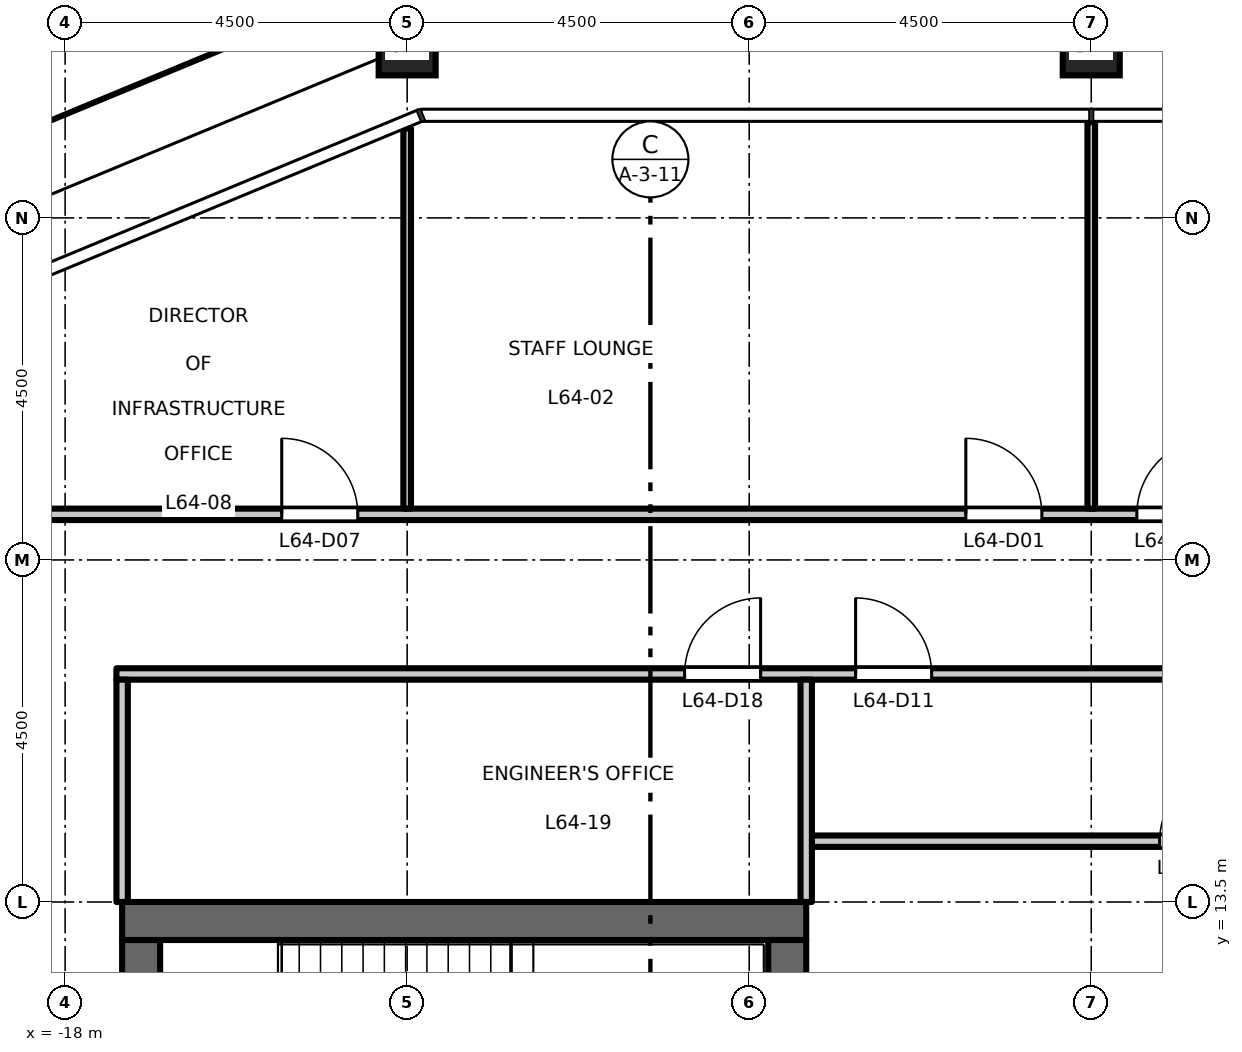
"""IFC4 building model, lengths in metres.
Left out: names, types, materials, properties, quantities, classifications, styles, units other than length and angle.
Written with IfcOpenShell. Run it as: python <this file> out.ifc"""

import sys

from ifc_helpers import new_model, si_unit, direction, frame, frame_2d, origin, origin_2d, place, context, subcontext, project, spatial, rectangle, hollow_rectangle, extrude, element, fill, save


model = new_model("IFC4")
c1 = context("Model", 3, precision=1e-05, world=origin(), true_north=direction((0.0, 1.0)))
c2 = subcontext(c1, "Body", "Model", "MODEL_VIEW")
j1 = project(units=[si_unit("LENGTHUNIT", "METRE"), si_unit("PLANEANGLEUNIT", "RADIAN")], contexts=[c1])
p1 = place(None, origin())
s1 = spatial("IfcSite", under=j1, at=p1, CompositionType="ELEMENT")
p2 = place(p1, origin())
s2 = spatial("IfcBuilding", under=s1, at=p2, CompositionType="ELEMENT")
p3 = place(p2, frame((0.0, 0.0, 298.7)))
s3 = spatial("IfcBuildingStorey", under=s2, at=p3, CompositionType="ELEMENT", Elevation=298.7)
for number, where, z_axis, x_axis in (
    (1, (-4.5, 24.75, 0.0), (0.0, 0.0, 1.0), (1.0, 0.0, 0.0)),
    (2, (-13.5, 24.75, 0.0), (0.0, 0.0, 1.0), (1.0, 0.0, 0.0)),
):
    element("IfcColumn", number, at=place(p3, frame(where, z_axis=z_axis, x_axis=x_axis)), inside=s3, PredefinedType="COLUMN", context=c2, shape_type="SweptSolid", body=[
        extrude(hollow_rectangle(XDim=0.75, YDim=0.75, WallThickness=0.04, at=origin_2d()), origin(), (0.0, 0.0, 1.0), 4.5),
    ])
p4 = place(p3, frame((-17.0, -13.0, 0.0), z_axis=(0.0, 0.0, 1.0), x_axis=(0.0, 1.0, 0.0)))
e3 = element("IfcWall", 3, at=p4, inside=s3, PredefinedType="SHEAR", context=c2, shape_type="SweptSolid", body=[
    extrude(rectangle(XDim=26.0, YDim=0.5, at=frame_2d((13.0, 0.0))), origin(), (0.0, 0.0, 1.0), 4.35),
])
p5 = place(p4, frame((16.825, 0.0, 0.0)))
e4 = element("IfcOpeningElement", 4, at=p5, cuts=e3, PredefinedType="OPENING", context=c2, shape_type="SweptSolid", body=[
    extrude(rectangle(XDim=1.8, YDim=2.1, at=frame_2d((0.9, 1.05))), frame((0.0, 0.26, 0.0), z_axis=(0.0, -1.0, 0.0), x_axis=(1.0, 0.0, 0.0)), (0.0, 0.0, 1.0), 0.52),
])
p6 = place(p4, frame((7.375, 0.0, 0.0)))
e5 = element("IfcOpeningElement", 5, at=p6, cuts=e3, PredefinedType="OPENING", context=c2, shape_type="SweptSolid", body=[
    extrude(rectangle(XDim=1.8, YDim=2.1, at=frame_2d((0.9, 1.05))), frame((0.0, 0.26, 0.0), z_axis=(0.0, -1.0, 0.0), x_axis=(1.0, 0.0, 0.0)), (0.0, 0.0, 1.0), 0.52),
])
p7 = place(p3, frame((-8.25, 13.25, 0.0), z_axis=(0.0, 0.0, 1.0), x_axis=(-1.0, 0.0, 0.0)))
e6 = element("IfcWall", 6, at=p7, inside=s3, PredefinedType="SHEAR", context=c2, shape_type="SweptSolid", body=[
    extrude(rectangle(XDim=9.0, YDim=0.5, at=frame_2d((4.5, 0.0))), origin(), (0.0, 0.0, 1.0), 4.35),
])
p8 = place(p3, frame((-8.5, -13.0, 0.0), z_axis=(0.0, 0.0, 1.0), x_axis=(0.0, 1.0, 0.0)))
e7 = element("IfcWall", 7, at=p8, inside=s3, PredefinedType="SHEAR", context=c2, shape_type="SweptSolid", body=[
    extrude(rectangle(XDim=26.0, YDim=0.5, at=frame_2d((13.0, 0.0))), origin(), (0.0, 0.0, 1.0), 4.35),
])
p9 = place(p3, frame((-8.175, 14.3, 0.0), z_axis=(0.0, 0.0, 1.0), x_axis=(1.0, 0.0, 0.0)))
e8 = element("IfcWall", 8, at=p9, inside=s3, PredefinedType="PARTITIONING", context=c2, shape_type="SweptSolid", body=[
    extrude(rectangle(XDim=15.095, YDim=0.15, at=frame_2d((7.547, 0.0))), origin(), (0.0, 0.0, 1.0), 4.35),
])
p10 = place(p9, frame((4.575, 0.0, 0.0)))
e9 = element("IfcOpeningElement", 9, at=p10, cuts=e8, PredefinedType="OPENING", context=c2, shape_type="SweptSolid", body=[
    extrude(rectangle(XDim=1.0, YDim=2.1, at=frame_2d((0.5, 1.05))), frame((0.0, 0.085, 0.0), z_axis=(0.0, -1.0, 0.0), x_axis=(1.0, 0.0, 0.0)), (0.0, 0.0, 1.0), 0.17),
])
p11 = place(p9, frame((6.825, 0.0, 0.0)))
e10 = element("IfcOpeningElement", 10, at=p11, cuts=e8, PredefinedType="OPENING", context=c2, shape_type="SweptSolid", body=[
    extrude(rectangle(XDim=1.0, YDim=2.1, at=frame_2d((0.5, 1.05))), frame((0.0, 0.085, 0.0), z_axis=(0.0, -1.0, 0.0), x_axis=(1.0, 0.0, 0.0)), (0.0, 0.0, 1.0), 0.17),
])
p12 = place(p9, frame((13.575, 0.0, 0.0)))
e11 = element("IfcOpeningElement", 11, at=p12, cuts=e8, PredefinedType="OPENING", context=c2, shape_type="SweptSolid", body=[
    extrude(rectangle(XDim=1.0, YDim=2.1, at=frame_2d((0.5, 1.05))), frame((0.0, 0.085, 0.0), z_axis=(0.0, -1.0, 0.0), x_axis=(1.0, 0.0, 0.0)), (0.0, 0.0, 1.0), 0.17),
])
p13 = place(p3, frame((-17.325, 16.5, 0.0), z_axis=(0.0, 0.0, 1.0), x_axis=(1.0, 0.0, 0.0)))
e12 = element("IfcWall", 12, at=p13, inside=s3, PredefinedType="PARTITIONING", context=c2, shape_type="SweptSolid", body=[
    extrude(rectangle(XDim=34.65, YDim=0.15, at=frame_2d((17.325, 0.0))), origin(), (0.0, 0.0, 1.0), 4.35),
])
p14 = place(p13, frame((9.725, 0.0, 0.0)))
e13 = element("IfcOpeningElement", 13, at=p14, cuts=e12, PredefinedType="OPENING", context=c2, shape_type="SweptSolid", body=[
    extrude(rectangle(XDim=1.0, YDim=2.1, at=frame_2d((0.5, 1.05))), frame((0.0, 0.085, 0.0), z_axis=(0.0, -1.0, 0.0), x_axis=(1.0, 0.0, 0.0)), (0.0, 0.0, 1.0), 0.17),
])
p15 = place(p13, frame((7.475, 0.0, 0.0)))
e14 = element("IfcOpeningElement", 14, at=p15, cuts=e12, PredefinedType="OPENING", context=c2, shape_type="SweptSolid", body=[
    extrude(rectangle(XDim=1.0, YDim=2.1, at=frame_2d((0.5, 1.05))), frame((0.0, 0.085, 0.0), z_axis=(0.0, -1.0, 0.0), x_axis=(1.0, 0.0, 0.0)), (0.0, 0.0, 1.0), 0.17),
])
p16 = place(p13, frame((26.225, 0.0, 0.0)))
e15 = element("IfcOpeningElement", 15, at=p16, cuts=e12, PredefinedType="OPENING", context=c2, shape_type="SweptSolid", body=[
    extrude(rectangle(XDim=1.0, YDim=2.1, at=frame_2d((0.5, 1.05))), frame((0.0, 0.085, 0.0), z_axis=(0.0, -1.0, 0.0), x_axis=(1.0, 0.0, 0.0)), (0.0, 0.0, 1.0), 0.17),
])
p17 = place(p3, frame((-21.566, 18.6, 0.0), z_axis=(0.0, 0.0, 1.0), x_axis=(1.0, 0.0, 0.0)))
e16 = element("IfcWall", 16, at=p17, inside=s3, PredefinedType="PARTITIONING", context=c2, shape_type="SweptSolid", body=[
    extrude(rectangle(XDim=43.132, YDim=0.15, at=frame_2d((21.566, 0.0))), origin(), (0.0, 0.0, 1.0), 4.35),
])
p18 = place(p17, frame((15.416, 0.0, 0.0)))
e17 = element("IfcOpeningElement", 17, at=p18, cuts=e16, PredefinedType="OPENING", context=c2, shape_type="SweptSolid", body=[
    extrude(rectangle(XDim=1.0, YDim=2.1, at=frame_2d((0.5, 1.05))), frame((0.0, 0.085, 0.0), z_axis=(0.0, -1.0, 0.0), x_axis=(1.0, 0.0, 0.0)), (0.0, 0.0, 1.0), 0.17),
])
p19 = place(p17, frame((17.666, 0.0, 0.0)))
e18 = element("IfcOpeningElement", 18, at=p19, cuts=e16, PredefinedType="OPENING", context=c2, shape_type="SweptSolid", body=[
    extrude(rectangle(XDim=1.0, YDim=2.1, at=frame_2d((0.5, 1.05))), frame((0.0, 0.085, 0.0), z_axis=(0.0, -1.0, 0.0), x_axis=(1.0, 0.0, 0.0)), (0.0, 0.0, 1.0), 0.17),
])
p20 = place(p17, frame((33.416, 0.0, 0.0)))
e19 = element("IfcOpeningElement", 19, at=p20, cuts=e16, PredefinedType="OPENING", context=c2, shape_type="SweptSolid", body=[
    extrude(rectangle(XDim=1.0, YDim=2.1, at=frame_2d((0.5, 1.05))), frame((0.0, 0.085, 0.0), z_axis=(0.0, -1.0, 0.0), x_axis=(1.0, 0.0, 0.0)), (0.0, 0.0, 1.0), 0.17),
])
p21 = place(p17, frame((6.416, 0.0, 0.0)))
e20 = element("IfcOpeningElement", 20, at=p21, cuts=e16, PredefinedType="OPENING", context=c2, shape_type="SweptSolid", body=[
    extrude(rectangle(XDim=1.0, YDim=2.1, at=frame_2d((0.5, 1.05))), frame((0.0, 0.085, 0.0), z_axis=(0.0, -1.0, 0.0), x_axis=(1.0, 0.0, 0.0)), (0.0, 0.0, 1.0), 0.17),
])
p22 = place(p17, frame((35.732, 0.0, 0.0)))
e21 = element("IfcOpeningElement", 21, at=p22, cuts=e16, PredefinedType="OPENING", context=c2, shape_type="SweptSolid", body=[
    extrude(rectangle(XDim=1.0, YDim=2.1, at=frame_2d((0.5, 1.05))), frame((0.0, 0.085, 0.0), z_axis=(0.0, -1.0, 0.0), x_axis=(1.0, 0.0, 0.0)), (0.0, 0.0, 1.0), 0.17),
])
p23 = place(p3, frame((-17.25, 13.5, 0.0), z_axis=(0.0, 0.0, 1.0), x_axis=(0.0, 1.0, 0.0)))
e22 = element("IfcWall", 22, at=p23, inside=s3, PredefinedType="PARTITIONING", context=c2, shape_type="SweptSolid", body=[
    extrude(rectangle(XDim=2.925, YDim=0.15, at=frame_2d((1.462, 0.0))), origin(), (0.0, 0.0, 1.0), 4.35),
])
p24 = place(p3, frame((-13.5, 18.675, 0.0), z_axis=(0.0, 0.0, 1.0), x_axis=(0.0, 1.0, 0.0)))
e23 = element("IfcWall", 23, at=p24, inside=s3, PredefinedType="PARTITIONING", context=c2, shape_type="SweptSolid", body=[
    extrude(rectangle(XDim=5.003, YDim=0.1, at=frame_2d((2.501, 0.0))), origin(), (0.0, 0.0, 1.0), 3.75),
])
p25 = place(p3, frame((-8.25, 13.5, 0.0), z_axis=(0.0, 0.0, 1.0), x_axis=(0.0, 1.0, 0.0)))
e24 = element("IfcWall", 24, at=p25, inside=s3, PredefinedType="PARTITIONING", context=c2, shape_type="SweptSolid", body=[
    extrude(rectangle(XDim=2.925, YDim=0.15, at=frame_2d((1.462, 0.0))), origin(), (0.0, 0.0, 1.0), 4.35),
])
p26 = place(p3, frame((-4.5, 18.675, 0.0), z_axis=(0.0, 0.0, 1.0), x_axis=(0.0, 1.0, 0.0)))
e25 = element("IfcWall", 25, at=p26, inside=s3, PredefinedType="PARTITIONING", context=c2, shape_type="SweptSolid", body=[
    extrude(rectangle(XDim=5.085, YDim=0.1, at=frame_2d((2.542, 0.0))), origin(), (0.0, 0.0, 1.0), 3.65),
])
p27 = place(p18, origin())
e26 = element("IfcDoor", 26, at=p27, inside=s3, OperationType="SINGLE_SWING_LEFT", PredefinedType="DOOR", context=c2, shape_type="SweptSolid", body=[
    extrude(rectangle(XDim=1.0, YDim=2.1, at=frame_2d((0.5, 1.05))), frame((0.0, 0.025, 0.0), z_axis=(0.0, -1.0, 0.0), x_axis=(1.0, 0.0, 0.0)), (0.0, 0.0, 1.0), 0.05),
])
fill(e17, e26)
p28 = place(p19, origin())
e27 = element("IfcDoor", 27, at=p28, inside=s3, OperationType="SINGLE_SWING_RIGHT", PredefinedType="DOOR", context=c2, shape_type="SweptSolid", body=[
    extrude(rectangle(XDim=1.0, YDim=2.1, at=frame_2d((0.5, 1.05))), frame((0.0, 0.025, 0.0), z_axis=(0.0, -1.0, 0.0), x_axis=(1.0, 0.0, 0.0)), (0.0, 0.0, 1.0), 0.05),
])
fill(e18, e27)
p29 = place(p21, origin())
e28 = element("IfcDoor", 28, at=p29, inside=s3, OperationType="SINGLE_SWING_LEFT", PredefinedType="DOOR", context=c2, shape_type="SweptSolid", body=[
    extrude(rectangle(XDim=1.0, YDim=2.1, at=frame_2d((0.5, 1.05))), frame((0.0, 0.025, 0.0), z_axis=(0.0, -1.0, 0.0), x_axis=(1.0, 0.0, 0.0)), (0.0, 0.0, 1.0), 0.05),
])
fill(e20, e28)
p30 = place(p14, origin())
e29 = element("IfcDoor", 29, at=p30, inside=s3, OperationType="SINGLE_SWING_LEFT", PredefinedType="DOOR", context=c2, shape_type="SweptSolid", body=[
    extrude(rectangle(XDim=1.0, YDim=2.1, at=frame_2d((0.5, 1.05))), frame((0.0, 0.025, 0.0), z_axis=(0.0, -1.0, 0.0), x_axis=(1.0, 0.0, 0.0)), (0.0, 0.0, 1.0), 0.05),
])
fill(e13, e29)
p31 = place(p10, origin())
e30 = element("IfcDoor", 30, at=p31, inside=s3, OperationType="SINGLE_SWING_RIGHT", PredefinedType="DOOR", context=c2, shape_type="SweptSolid", body=[
    extrude(rectangle(XDim=1.0, YDim=2.1, at=frame_2d((0.5, 1.05))), frame((0.0, 0.025, 0.0), z_axis=(0.0, -1.0, 0.0), x_axis=(1.0, 0.0, 0.0)), (0.0, 0.0, 1.0), 0.05),
])
fill(e9, e30)
p32 = place(p15, origin())
e31 = element("IfcDoor", 31, at=p32, inside=s3, OperationType="SINGLE_SWING_RIGHT", PredefinedType="DOOR", context=c2, shape_type="SweptSolid", body=[
    extrude(rectangle(XDim=1.0, YDim=2.1, at=frame_2d((0.5, 1.05))), frame((0.0, 0.025, 0.0), z_axis=(0.0, -1.0, 0.0), x_axis=(1.0, 0.0, 0.0)), (0.0, 0.0, 1.0), 0.05),
])
fill(e14, e31)
save(model, sys.argv[1])
